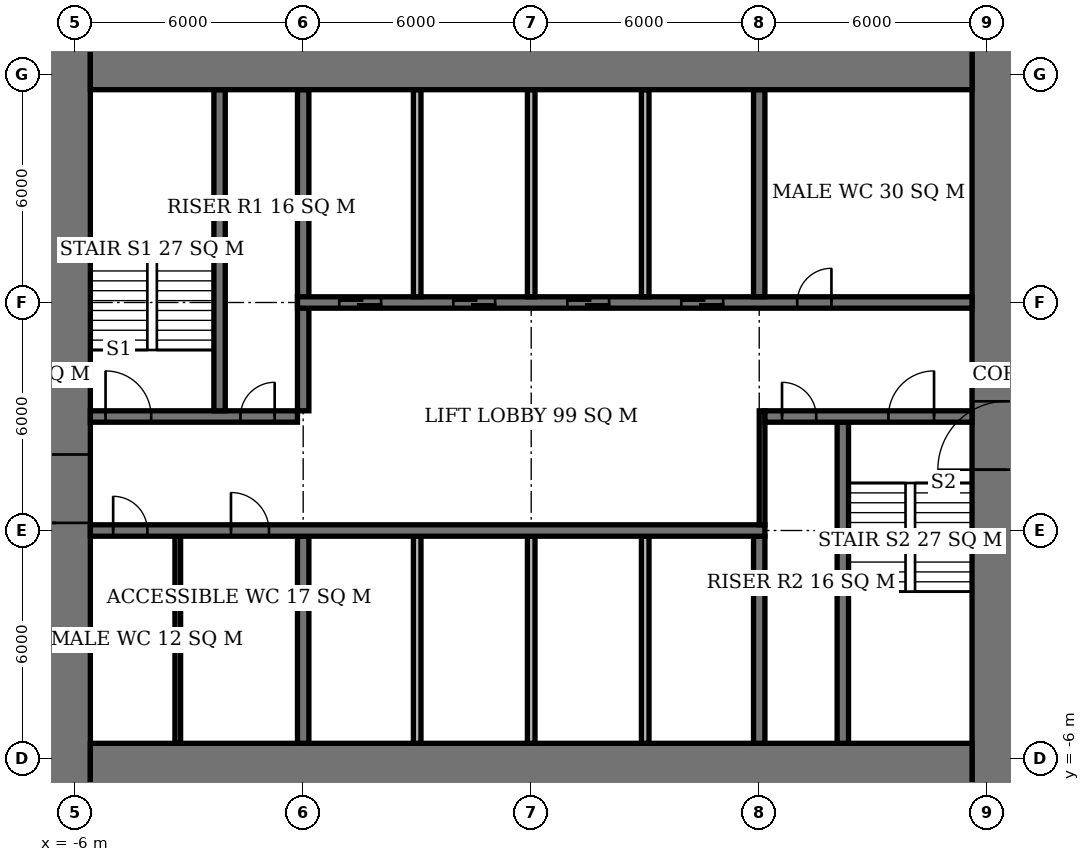
"""IFC4 building model, lengths in metres.
Left out: names, types, materials, properties, quantities, classifications, styles, units other than length and angle.
Written with IfcOpenShell. Run it as: python <this file> out.ifc"""

import sys

from ifc_helpers import new_model, si_unit, direction, frame, frame_2d, origin, place, context, subcontext, project, spatial, rectangle, extrude, element, fill, save


model = new_model("IFC4")
c1 = context("Model", 3, precision=1e-05, world=origin(), true_north=direction((0.0, 1.0)))
c2 = subcontext(c1, "Body", "Model", "MODEL_VIEW")
j1 = project(units=[si_unit("LENGTHUNIT", "METRE"), si_unit("PLANEANGLEUNIT", "RADIAN")], contexts=[c1])
p1 = place(None, origin())
s1 = spatial("IfcSite", under=j1, at=p1, CompositionType="ELEMENT")
p2 = place(p1, origin())
s2 = spatial("IfcBuilding", under=s1, at=p2, CompositionType="ELEMENT")
p3 = place(p2, frame((0.0, 0.0, 76.7)))
s3 = spatial("IfcBuildingStorey", under=s2, at=p3, CompositionType="ELEMENT", Elevation=76.7)
for number, where, z_axis, x_axis in (
    (1, (-5.6, -6.6, 0.0), (0.0, 0.0, 1.0), (1.0, 0.0, 0.0)),
    (2, (-5.6, 12.6, 0.0), (0.0, 0.0, 1.0), (1.0, 0.0, 0.0)),
):
    element("IfcWall", number, at=place(p3, frame(where, z_axis=z_axis, x_axis=x_axis)), inside=s3, PredefinedType="SHEAR", context=c2, shape_type="SweptSolid", body=[
        extrude(rectangle(XDim=23.2, YDim=2.0, at=frame_2d((11.6, 0.0))), origin(), (0.0, 0.0, 1.0), 3.9),
    ])
p4 = place(p3, frame((-6.5, -7.6, 0.0), z_axis=(0.0, 0.0, 1.0), x_axis=(0.0, 1.0, 0.0)))
e3 = element("IfcWall", 3, at=p4, inside=s3, PredefinedType="SHEAR", context=c2, shape_type="SweptSolid", body=[
    extrude(rectangle(XDim=21.2, YDim=1.8, at=frame_2d((10.6, 0.0))), origin(), (0.0, 0.0, 1.0), 3.9),
])
p5 = place(p4, frame((7.8, 0.0, 0.0)))
e4 = element("IfcOpeningElement", 4, at=p5, cuts=e3, PredefinedType="OPENING", context=c2, shape_type="SweptSolid", body=[
    extrude(rectangle(XDim=1.8, YDim=2.4, at=frame_2d((0.9, 1.2))), frame((0.0, 0.91, 0.0), z_axis=(0.0, -1.0, 0.0), x_axis=(1.0, 0.0, 0.0)), (0.0, 0.0, 1.0), 1.82),
])
p6 = place(p3, frame((18.5, -7.6, 0.0), z_axis=(0.0, 0.0, 1.0), x_axis=(0.0, 1.0, 0.0)))
e5 = element("IfcWall", 5, at=p6, inside=s3, PredefinedType="SHEAR", context=c2, shape_type="SweptSolid", body=[
    extrude(rectangle(XDim=21.2, YDim=1.8, at=frame_2d((10.6, 0.0))), origin(), (0.0, 0.0, 1.0), 3.9),
])
p7 = place(p6, frame((9.2, 0.0, 0.0)))
e6 = element("IfcOpeningElement", 6, at=p7, cuts=e5, PredefinedType="OPENING", context=c2, shape_type="SweptSolid", body=[
    extrude(rectangle(XDim=1.8, YDim=2.4, at=frame_2d((0.9, 1.2))), frame((0.0, 0.91, 0.0), z_axis=(0.0, -1.0, 0.0), x_axis=(1.0, 0.0, 0.0)), (0.0, 0.0, 1.0), 1.82),
])
p8 = place(p3, frame((-5.6, 0.0, 0.0), z_axis=(0.0, 0.0, 1.0), x_axis=(1.0, 0.0, 0.0)))
e7 = element("IfcWall", 7, at=p8, inside=s3, PredefinedType="SHEAR", context=c2, shape_type="SweptSolid", body=[
    extrude(rectangle(XDim=17.75, YDim=0.3, at=frame_2d((8.875, 0.0))), origin(), (0.0, 0.0, 1.0), 3.9),
])
p9 = place(p8, frame((0.6, 0.0, 0.0)))
e8 = element("IfcOpeningElement", 8, at=p9, cuts=e7, PredefinedType="OPENING", context=c2, shape_type="SweptSolid", body=[
    extrude(rectangle(XDim=0.9, YDim=2.1, at=frame_2d((0.45, 1.05))), frame((0.0, 0.16, 0.0), z_axis=(0.0, -1.0, 0.0), x_axis=(1.0, 0.0, 0.0)), (0.0, 0.0, 1.0), 0.32),
])
p10 = place(p8, frame((3.7, 0.0, 0.0)))
e9 = element("IfcOpeningElement", 9, at=p10, cuts=e7, PredefinedType="OPENING", context=c2, shape_type="SweptSolid", body=[
    extrude(rectangle(XDim=1.0, YDim=2.1, at=frame_2d((0.5, 1.05))), frame((0.0, 0.16, 0.0), z_axis=(0.0, -1.0, 0.0), x_axis=(1.0, 0.0, 0.0)), (0.0, 0.0, 1.0), 0.32),
])
p11 = place(p3, frame((-5.6, 3.0, 0.0), z_axis=(0.0, 0.0, 1.0), x_axis=(1.0, 0.0, 0.0)))
e10 = element("IfcWall", 10, at=p11, inside=s3, PredefinedType="SHEAR", context=c2, shape_type="SweptSolid", body=[
    extrude(rectangle(XDim=5.45, YDim=0.3, at=frame_2d((2.725, 0.0))), origin(), (0.0, 0.0, 1.0), 3.9),
])
p12 = place(p11, frame((0.4, 0.0, 0.0)))
e11 = element("IfcOpeningElement", 11, at=p12, cuts=e10, PredefinedType="OPENING", context=c2, shape_type="SweptSolid", body=[
    extrude(rectangle(XDim=1.2, YDim=2.1, at=frame_2d((0.6, 1.05))), frame((0.0, 0.16, 0.0), z_axis=(0.0, -1.0, 0.0), x_axis=(1.0, 0.0, 0.0)), (0.0, 0.0, 1.0), 0.32),
])
p13 = place(p11, frame((3.95, 0.0, 0.0)))
e12 = element("IfcOpeningElement", 12, at=p13, cuts=e10, PredefinedType="OPENING", context=c2, shape_type="SweptSolid", body=[
    extrude(rectangle(XDim=0.9, YDim=2.1, at=frame_2d((0.45, 1.05))), frame((0.0, 0.16, 0.0), z_axis=(0.0, -1.0, 0.0), x_axis=(1.0, 0.0, 0.0)), (0.0, 0.0, 1.0), 0.32),
])
p14 = place(p3, frame((12.15, 3.0, 0.0), z_axis=(0.0, 0.0, 1.0), x_axis=(1.0, 0.0, 0.0)))
e13 = element("IfcWall", 13, at=p14, inside=s3, PredefinedType="SHEAR", context=c2, shape_type="SweptSolid", body=[
    extrude(rectangle(XDim=5.45, YDim=0.3, at=frame_2d((2.725, 0.0))), origin(), (0.0, 0.0, 1.0), 3.9),
])
p15 = place(p14, frame((3.25, 0.0, 0.0)))
e14 = element("IfcOpeningElement", 14, at=p15, cuts=e13, PredefinedType="OPENING", context=c2, shape_type="SweptSolid", body=[
    extrude(rectangle(XDim=1.2, YDim=2.1, at=frame_2d((0.6, 1.05))), frame((0.0, 0.16, 0.0), z_axis=(0.0, -1.0, 0.0), x_axis=(1.0, 0.0, 0.0)), (0.0, 0.0, 1.0), 0.32),
])
p16 = place(p14, frame((0.45, 0.0, 0.0)))
e15 = element("IfcOpeningElement", 15, at=p16, cuts=e13, PredefinedType="OPENING", context=c2, shape_type="SweptSolid", body=[
    extrude(rectangle(XDim=0.9, YDim=2.1, at=frame_2d((0.45, 1.05))), frame((0.0, 0.16, 0.0), z_axis=(0.0, -1.0, 0.0), x_axis=(1.0, 0.0, 0.0)), (0.0, 0.0, 1.0), 0.32),
])
p17 = place(p3, frame((-0.15, 6.0, 0.0), z_axis=(0.0, 0.0, 1.0), x_axis=(1.0, 0.0, 0.0)))
e16 = element("IfcWall", 16, at=p17, inside=s3, PredefinedType="SHEAR", context=c2, shape_type="SweptSolid", body=[
    extrude(rectangle(XDim=17.75, YDim=0.3, at=frame_2d((8.875, 0.0))), origin(), (0.0, 0.0, 1.0), 3.9),
])
p18 = place(p17, frame((13.15, 0.0, 0.0)))
e17 = element("IfcOpeningElement", 17, at=p18, cuts=e16, PredefinedType="OPENING", context=c2, shape_type="SweptSolid", body=[
    extrude(rectangle(XDim=0.9, YDim=2.1, at=frame_2d((0.45, 1.05))), frame((0.0, 0.16, 0.0), z_axis=(0.0, -1.0, 0.0), x_axis=(1.0, 0.0, 0.0)), (0.0, 0.0, 1.0), 0.32),
])
p19 = place(p17, frame((1.1, 0.0, 0.0)))
e18 = element("IfcOpeningElement", 18, at=p19, cuts=e16, PredefinedType="OPENING", context=c2, shape_type="SweptSolid", body=[
    extrude(rectangle(XDim=1.1, YDim=2.1, at=frame_2d((0.55, 1.05))), frame((0.0, 0.16, 0.0), z_axis=(0.0, -1.0, 0.0), x_axis=(1.0, 0.0, 0.0)), (0.0, 0.0, 1.0), 0.32),
])
p20 = place(p17, frame((4.1, 0.0, 0.0)))
e19 = element("IfcOpeningElement", 19, at=p20, cuts=e16, PredefinedType="OPENING", context=c2, shape_type="SweptSolid", body=[
    extrude(rectangle(XDim=1.1, YDim=2.1, at=frame_2d((0.55, 1.05))), frame((0.0, 0.16, 0.0), z_axis=(0.0, -1.0, 0.0), x_axis=(1.0, 0.0, 0.0)), (0.0, 0.0, 1.0), 0.32),
])
p21 = place(p17, frame((7.1, 0.0, 0.0)))
e20 = element("IfcOpeningElement", 20, at=p21, cuts=e16, PredefinedType="OPENING", context=c2, shape_type="SweptSolid", body=[
    extrude(rectangle(XDim=1.1, YDim=2.1, at=frame_2d((0.55, 1.05))), frame((0.0, 0.16, 0.0), z_axis=(0.0, -1.0, 0.0), x_axis=(1.0, 0.0, 0.0)), (0.0, 0.0, 1.0), 0.32),
])
p22 = place(p17, frame((10.1, 0.0, 0.0)))
e21 = element("IfcOpeningElement", 21, at=p22, cuts=e16, PredefinedType="OPENING", context=c2, shape_type="SweptSolid", body=[
    extrude(rectangle(XDim=1.1, YDim=2.1, at=frame_2d((0.55, 1.05))), frame((0.0, 0.16, 0.0), z_axis=(0.0, -1.0, 0.0), x_axis=(1.0, 0.0, 0.0)), (0.0, 0.0, 1.0), 0.32),
])
p23 = place(p3, frame((0.0, -5.6, 0.0), z_axis=(0.0, 0.0, 1.0), x_axis=(0.0, 1.0, 0.0)))
e22 = element("IfcWall", 22, at=p23, inside=s3, PredefinedType="SHEAR", context=c2, shape_type="SweptSolid", body=[
    extrude(rectangle(XDim=5.45, YDim=0.3, at=frame_2d((2.725, 0.0))), origin(), (0.0, 0.0, 1.0), 3.9),
])
p24 = place(p3, frame((0.0, 3.15, 0.0), z_axis=(0.0, 0.0, 1.0), x_axis=(0.0, 1.0, 0.0)))
e23 = element("IfcWall", 23, at=p24, inside=s3, PredefinedType="SHEAR", context=c2, shape_type="SweptSolid", body=[
    extrude(rectangle(XDim=8.45, YDim=0.3, at=frame_2d((4.225, 0.0))), origin(), (0.0, 0.0, 1.0), 3.9),
])
for number, where, z_axis, x_axis in (
    (24, (12.0, -5.6, 0.0), (0.0, 0.0, 1.0), (0.0, 1.0, 0.0)),
    (25, (12.0, 6.15, 0.0), (0.0, 0.0, 1.0), (0.0, 1.0, 0.0)),
):
    element("IfcWall", number, at=place(p3, frame(where, z_axis=z_axis, x_axis=x_axis)), inside=s3, PredefinedType="SHEAR", context=c2, shape_type="SweptSolid", body=[
        extrude(rectangle(XDim=5.45, YDim=0.3, at=frame_2d((2.725, 0.0))), origin(), (0.0, 0.0, 1.0), 3.9),
    ])
for number, where, z_axis, x_axis in (
    (26, (-2.2, 3.15, 0.0), (0.0, 0.0, 1.0), (0.0, 1.0, 0.0)),
    (27, (14.2, -5.6, 0.0), (0.0, 0.0, 1.0), (0.0, 1.0, 0.0)),
):
    element("IfcWall", number, at=place(p3, frame(where, z_axis=z_axis, x_axis=x_axis)), inside=s3, PredefinedType="SHEAR", context=c2, shape_type="SweptSolid", body=[
        extrude(rectangle(XDim=8.45, YDim=0.3, at=frame_2d((4.225, 0.0))), origin(), (0.0, 0.0, 1.0), 3.9),
    ])
for number, where, z_axis, x_axis in (
    (28, (3.0, 6.15, 0.0), (0.0, 0.0, 1.0), (0.0, 1.0, 0.0)),
    (29, (6.0, 6.15, 0.0), (0.0, 0.0, 1.0), (0.0, 1.0, 0.0)),
    (30, (9.0, 6.15, 0.0), (0.0, 0.0, 1.0), (0.0, 1.0, 0.0)),
    (31, (3.0, -5.6, 0.0), (0.0, 0.0, 1.0), (0.0, 1.0, 0.0)),
    (32, (6.0, -5.6, 0.0), (0.0, 0.0, 1.0), (0.0, 1.0, 0.0)),
    (33, (9.0, -5.6, 0.0), (0.0, 0.0, 1.0), (0.0, 1.0, 0.0)),
):
    element("IfcWall", number, at=place(p3, frame(where, z_axis=z_axis, x_axis=x_axis)), inside=s3, PredefinedType="SOLIDWALL", context=c2, shape_type="SweptSolid", body=[
        extrude(rectangle(XDim=5.45, YDim=0.2, at=frame_2d((2.725, 0.0))), origin(), (0.0, 0.0, 1.0), 3.9),
    ])
p25 = place(p3, frame((-3.3, -5.6, 0.0), z_axis=(0.0, 0.0, 1.0), x_axis=(0.0, 1.0, 0.0)))
e34 = element("IfcWall", 34, at=p25, inside=s3, PredefinedType="PLUMBINGWALL", context=c2, shape_type="SweptSolid", body=[
    extrude(rectangle(XDim=5.45, YDim=0.15, at=frame_2d((2.725, 0.0))), origin(), (0.0, 0.0, 1.0), 3.65),
])
p26 = place(p3, frame((12.075, 0.15, 0.0), z_axis=(0.0, 0.0, 1.0), x_axis=(0.0, 1.0, 0.0)))
e35 = element("IfcWall", 35, at=p26, inside=s3, PredefinedType="PARTITIONING", context=c2, shape_type="SweptSolid", body=[
    extrude(rectangle(XDim=3.0, YDim=0.15, at=frame_2d((1.5, 0.0))), origin(), (0.0, 0.0, 1.0), 3.65),
])
p27 = place(p5, origin())
e36 = element("IfcDoor", 36, at=p27, inside=s3, OperationType="DOUBLE_DOOR_SINGLE_SWING", PredefinedType="DOOR", context=c2, shape_type="SweptSolid", body=[
    extrude(rectangle(XDim=1.8, YDim=2.4, at=frame_2d((0.9, 1.2))), frame((0.0, 0.025, 0.0), z_axis=(0.0, -1.0, 0.0), x_axis=(1.0, 0.0, 0.0)), (0.0, 0.0, 1.0), 0.05),
])
fill(e4, e36)
p28 = place(p7, origin())
e37 = element("IfcDoor", 37, at=p28, inside=s3, OperationType="DOUBLE_DOOR_SINGLE_SWING", PredefinedType="DOOR", context=c2, shape_type="SweptSolid", body=[
    extrude(rectangle(XDim=1.8, YDim=2.4, at=frame_2d((0.9, 1.2))), frame((0.0, 0.025, 0.0), z_axis=(0.0, -1.0, 0.0), x_axis=(1.0, 0.0, 0.0)), (0.0, 0.0, 1.0), 0.05),
])
fill(e6, e37)
p29 = place(p12, origin())
e38 = element("IfcDoor", 38, at=p29, inside=s3, OperationType="SINGLE_SWING_LEFT", PredefinedType="DOOR", context=c2, shape_type="SweptSolid", body=[
    extrude(rectangle(XDim=1.2, YDim=2.1, at=frame_2d((0.6, 1.05))), frame((0.0, 0.025, 0.0), z_axis=(0.0, -1.0, 0.0), x_axis=(1.0, 0.0, 0.0)), (0.0, 0.0, 1.0), 0.05),
])
fill(e11, e38)
p30 = place(p13, origin())
e39 = element("IfcDoor", 39, at=p30, inside=s3, OperationType="SINGLE_SWING_RIGHT", PredefinedType="DOOR", context=c2, shape_type="SweptSolid", body=[
    extrude(rectangle(XDim=0.9, YDim=2.1, at=frame_2d((0.45, 1.05))), frame((0.0, 0.025, 0.0), z_axis=(0.0, -1.0, 0.0), x_axis=(1.0, 0.0, 0.0)), (0.0, 0.0, 1.0), 0.05),
])
fill(e12, e39)
p31 = place(p15, origin())
e40 = element("IfcDoor", 40, at=p31, inside=s3, OperationType="SINGLE_SWING_RIGHT", PredefinedType="DOOR", context=c2, shape_type="SweptSolid", body=[
    extrude(rectangle(XDim=1.2, YDim=2.1, at=frame_2d((0.6, 1.05))), frame((0.0, 0.025, 0.0), z_axis=(0.0, -1.0, 0.0), x_axis=(1.0, 0.0, 0.0)), (0.0, 0.0, 1.0), 0.05),
])
fill(e14, e40)
p32 = place(p16, origin())
e41 = element("IfcDoor", 41, at=p32, inside=s3, OperationType="SINGLE_SWING_LEFT", PredefinedType="DOOR", context=c2, shape_type="SweptSolid", body=[
    extrude(rectangle(XDim=0.9, YDim=2.1, at=frame_2d((0.45, 1.05))), frame((0.0, 0.025, 0.0), z_axis=(0.0, -1.0, 0.0), x_axis=(1.0, 0.0, 0.0)), (0.0, 0.0, 1.0), 0.05),
])
fill(e15, e41)
p33 = place(p9, origin())
e42 = element("IfcDoor", 42, at=p33, inside=s3, OperationType="SINGLE_SWING_LEFT", PredefinedType="DOOR", context=c2, shape_type="SweptSolid", body=[
    extrude(rectangle(XDim=0.9, YDim=2.1, at=frame_2d((0.45, 1.05))), frame((0.0, 0.025, 0.0), z_axis=(0.0, -1.0, 0.0), x_axis=(1.0, 0.0, 0.0)), (0.0, 0.0, 1.0), 0.05),
])
fill(e8, e42)
p34 = place(p10, origin())
e43 = element("IfcDoor", 43, at=p34, inside=s3, OperationType="SINGLE_SWING_LEFT", PredefinedType="DOOR", context=c2, shape_type="SweptSolid", body=[
    extrude(rectangle(XDim=1.0, YDim=2.1, at=frame_2d((0.5, 1.05))), frame((0.0, 0.025, 0.0), z_axis=(0.0, -1.0, 0.0), x_axis=(1.0, 0.0, 0.0)), (0.0, 0.0, 1.0), 0.05),
])
fill(e9, e43)
p35 = place(p18, origin())
e44 = element("IfcDoor", 44, at=p35, inside=s3, OperationType="SINGLE_SWING_RIGHT", PredefinedType="DOOR", context=c2, shape_type="SweptSolid", body=[
    extrude(rectangle(XDim=0.9, YDim=2.1, at=frame_2d((0.45, 1.05))), frame((0.0, 0.025, 0.0), z_axis=(0.0, -1.0, 0.0), x_axis=(1.0, 0.0, 0.0)), (0.0, 0.0, 1.0), 0.05),
])
fill(e17, e44)
p36 = place(p19, origin())
e45 = element("IfcDoor", 45, at=p36, inside=s3, OperationType="DOUBLE_DOOR_SLIDING", PredefinedType="USERDEFINED", context=c2, shape_type="SweptSolid", body=[
    extrude(rectangle(XDim=1.1, YDim=2.1, at=frame_2d((0.55, 1.05))), frame((0.0, 0.025, 0.0), z_axis=(0.0, -1.0, 0.0), x_axis=(1.0, 0.0, 0.0)), (0.0, 0.0, 1.0), 0.05),
])
fill(e18, e45)
p37 = place(p20, origin())
e46 = element("IfcDoor", 46, at=p37, inside=s3, OperationType="DOUBLE_DOOR_SLIDING", PredefinedType="USERDEFINED", context=c2, shape_type="SweptSolid", body=[
    extrude(rectangle(XDim=1.1, YDim=2.1, at=frame_2d((0.55, 1.05))), frame((0.0, 0.025, 0.0), z_axis=(0.0, -1.0, 0.0), x_axis=(1.0, 0.0, 0.0)), (0.0, 0.0, 1.0), 0.05),
])
fill(e19, e46)
p38 = place(p21, origin())
e47 = element("IfcDoor", 47, at=p38, inside=s3, OperationType="DOUBLE_DOOR_SLIDING", PredefinedType="USERDEFINED", context=c2, shape_type="SweptSolid", body=[
    extrude(rectangle(XDim=1.1, YDim=2.1, at=frame_2d((0.55, 1.05))), frame((0.0, 0.025, 0.0), z_axis=(0.0, -1.0, 0.0), x_axis=(1.0, 0.0, 0.0)), (0.0, 0.0, 1.0), 0.05),
])
fill(e20, e47)
p39 = place(p22, origin())
e48 = element("IfcDoor", 48, at=p39, inside=s3, OperationType="DOUBLE_DOOR_SLIDING", PredefinedType="USERDEFINED", context=c2, shape_type="SweptSolid", body=[
    extrude(rectangle(XDim=1.1, YDim=2.1, at=frame_2d((0.55, 1.05))), frame((0.0, 0.025, 0.0), z_axis=(0.0, -1.0, 0.0), x_axis=(1.0, 0.0, 0.0)), (0.0, 0.0, 1.0), 0.05),
])
fill(e21, e48)
save(model, sys.argv[1])
